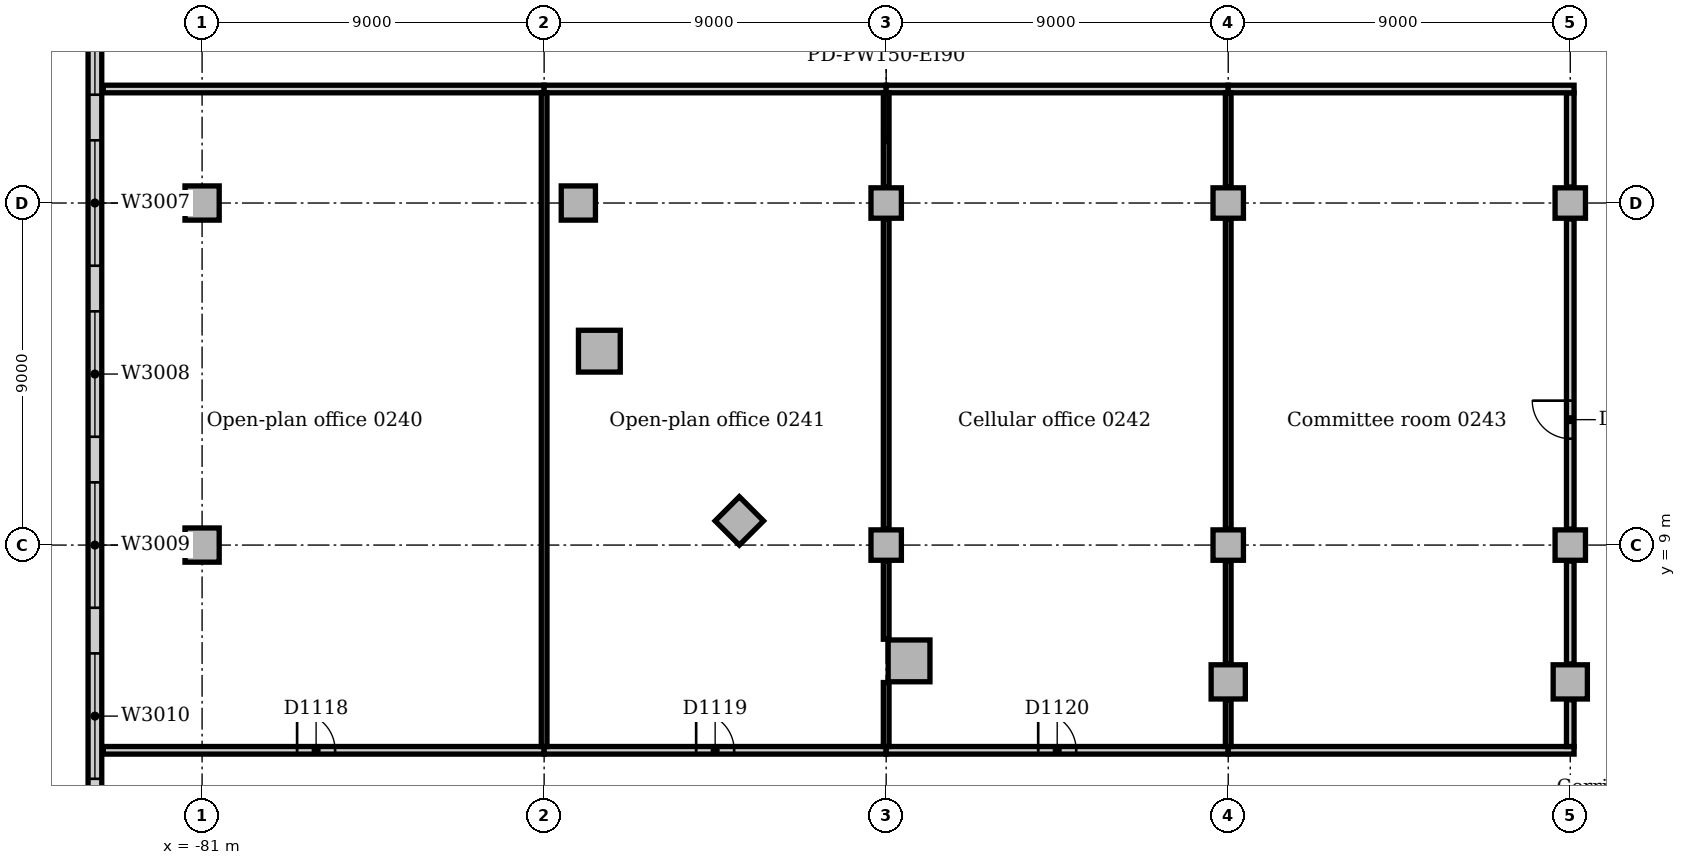
"""IFC4 building model, lengths in metres.
Left out: names, types, materials, properties, quantities, classifications, styles, units other than length and angle.
Written with IfcOpenShell. Run it as: python <this file> out.ifc"""

import sys

from ifc_helpers import new_model, si_unit, direction, frame, frame_2d, origin, origin_2d, place, context, subcontext, project, spatial, rectangle, extrude, element, fill, save


model = new_model("IFC4")
c1 = context("Model", 3, precision=1e-05, world=origin(), true_north=direction((0.0, 1.0)))
c2 = subcontext(c1, "Body", "Model", "MODEL_VIEW")
j1 = project(units=[si_unit("LENGTHUNIT", "METRE"), si_unit("PLANEANGLEUNIT", "RADIAN")], contexts=[c1])
p1 = place(None, origin())
s1 = spatial("IfcSite", under=j1, at=p1, CompositionType="ELEMENT")
p2 = place(p1, origin())
s2 = spatial("IfcBuilding", under=s1, at=p2, CompositionType="ELEMENT")
p3 = place(p2, frame((0.0, 0.0, 11.0)))
s3 = spatial("IfcBuildingStorey", under=s2, at=p3, CompositionType="ELEMENT", Elevation=11.0)
for number, where, z_axis, x_axis in (
    (1, (-62.398, 5.953, 0.0), (0.0, 0.0, 1.0), (1.0, 0.0, 0.0)),
    (2, (-70.547, 14.102, 0.0), (0.0, 0.0, 1.0), (1.0, 0.0, 0.0)),
):
    element("IfcColumn", number, at=place(p3, frame(where, z_axis=z_axis, x_axis=x_axis)), inside=s3, PredefinedType="COLUMN", context=c2, shape_type="SweptSolid", body=[
        extrude(rectangle(XDim=1.1, YDim=1.1, at=origin_2d()), origin(), (0.0, 0.0, 1.0), 4.7),
    ])
for number, where, z_axis, x_axis in (
    (3, (-54.0, 5.4, 0.0), (0.0, 0.0, 1.0), (1.0, 0.0, 0.0)),
    (4, (-45.0, 5.4, 0.0), (0.0, 0.0, 1.0), (1.0, 0.0, 0.0)),
    (5, (-71.1, 18.0, 0.0), (0.0, 0.0, 1.0), (1.0, 0.0, 0.0)),
    (6, (-66.864, 9.636, 0.0), (0.0, 0.0, 1.0), (0.707, 0.707, 0.0)),
):
    element("IfcColumn", number, at=place(p3, frame(where, z_axis=z_axis, x_axis=x_axis)), inside=s3, PredefinedType="COLUMN", context=c2, shape_type="SweptSolid", body=[
        extrude(rectangle(XDim=0.9, YDim=0.9, at=origin_2d()), origin(), (0.0, 0.0, 1.0), 4.7),
    ])
for number, where, z_axis, x_axis in (
    (7, (-63.0, 9.0, 0.0), (0.0, 0.0, 1.0), (1.0, 0.0, 0.0)),
    (8, (-63.0, 18.0, 0.0), (0.0, 0.0, 1.0), (1.0, 0.0, 0.0)),
    (9, (-54.0, 9.0, 0.0), (0.0, 0.0, 1.0), (1.0, 0.0, 0.0)),
    (10, (-54.0, 18.0, 0.0), (0.0, 0.0, 1.0), (1.0, 0.0, 0.0)),
    (11, (-45.0, 9.0, 0.0), (0.0, 0.0, 1.0), (1.0, 0.0, 0.0)),
    (12, (-45.0, 18.0, 0.0), (0.0, 0.0, 1.0), (1.0, 0.0, 0.0)),
):
    element("IfcColumn", number, at=place(p3, frame(where, z_axis=z_axis, x_axis=x_axis)), inside=s3, PredefinedType="COLUMN", context=c2, shape_type="SweptSolid", body=[
        extrude(rectangle(XDim=0.8, YDim=0.8, at=origin_2d()), origin(), (0.0, 0.0, 1.0), 4.7),
    ])
for number, where, z_axis, x_axis in (
    (13, (-81.0, 9.0, 0.0), (0.0, 0.0, 1.0), (1.0, 0.0, 0.0)),
    (14, (-81.0, 18.0, 0.0), (0.0, 0.0, 1.0), (1.0, 0.0, 0.0)),
):
    element("IfcColumn", number, at=place(p3, frame(where, z_axis=z_axis, x_axis=x_axis)), inside=s3, PredefinedType="COLUMN", context=c2, shape_type="SweptSolid", body=[
        extrude(rectangle(XDim=0.9, YDim=0.9, at=origin_2d()), origin(), (0.0, 0.0, 1.0), 4.7),
    ])
p4 = place(p3, frame((-83.82, 54.0, 0.0), z_axis=(0.0, 0.0, 1.0), x_axis=(0.0, -1.0, 0.0)))
e15 = element("IfcWall", 15, at=p4, inside=s3, PredefinedType="STANDARD", context=c2, shape_type="SweptSolid", body=[
    extrude(rectangle(XDim=63.0, YDim=0.36, at=frame_2d((31.5, 0.0))), origin(), (0.0, 0.0, 1.0), 4.7),
])
p5 = place(p4, frame((2.85, 0.0, 0.9)))
e16 = element("IfcOpeningElement", 16, at=p5, cuts=e15, PredefinedType="OPENING", context=c2, shape_type="SweptSolid", body=[
    extrude(rectangle(XDim=3.3, YDim=2.4, at=frame_2d((1.65, 1.2))), frame((0.0, 0.19, 0.0), z_axis=(0.0, -1.0, 0.0), x_axis=(1.0, 0.0, 0.0)), (0.0, 0.0, 1.0), 0.38),
])
p6 = place(p4, frame((7.35, 0.0, 0.9)))
e17 = element("IfcOpeningElement", 17, at=p6, cuts=e15, PredefinedType="OPENING", context=c2, shape_type="SweptSolid", body=[
    extrude(rectangle(XDim=3.3, YDim=2.4, at=frame_2d((1.65, 1.2))), frame((0.0, 0.19, 0.0), z_axis=(0.0, -1.0, 0.0), x_axis=(1.0, 0.0, 0.0)), (0.0, 0.0, 1.0), 0.38),
])
p7 = place(p4, frame((11.85, 0.0, 0.9)))
e18 = element("IfcOpeningElement", 18, at=p7, cuts=e15, PredefinedType="OPENING", context=c2, shape_type="SweptSolid", body=[
    extrude(rectangle(XDim=3.3, YDim=2.4, at=frame_2d((1.65, 1.2))), frame((0.0, 0.19, 0.0), z_axis=(0.0, -1.0, 0.0), x_axis=(1.0, 0.0, 0.0)), (0.0, 0.0, 1.0), 0.38),
])
p8 = place(p4, frame((16.35, 0.0, 0.9)))
e19 = element("IfcOpeningElement", 19, at=p8, cuts=e15, PredefinedType="OPENING", context=c2, shape_type="SweptSolid", body=[
    extrude(rectangle(XDim=3.3, YDim=2.4, at=frame_2d((1.65, 1.2))), frame((0.0, 0.19, 0.0), z_axis=(0.0, -1.0, 0.0), x_axis=(1.0, 0.0, 0.0)), (0.0, 0.0, 1.0), 0.38),
])
p9 = place(p4, frame((20.85, 0.0, 0.9)))
e20 = element("IfcOpeningElement", 20, at=p9, cuts=e15, PredefinedType="OPENING", context=c2, shape_type="SweptSolid", body=[
    extrude(rectangle(XDim=3.3, YDim=2.4, at=frame_2d((1.65, 1.2))), frame((0.0, 0.19, 0.0), z_axis=(0.0, -1.0, 0.0), x_axis=(1.0, 0.0, 0.0)), (0.0, 0.0, 1.0), 0.38),
])
p10 = place(p4, frame((25.35, 0.0, 0.9)))
e21 = element("IfcOpeningElement", 21, at=p10, cuts=e15, PredefinedType="OPENING", context=c2, shape_type="SweptSolid", body=[
    extrude(rectangle(XDim=3.3, YDim=2.4, at=frame_2d((1.65, 1.2))), frame((0.0, 0.19, 0.0), z_axis=(0.0, -1.0, 0.0), x_axis=(1.0, 0.0, 0.0)), (0.0, 0.0, 1.0), 0.38),
])
p11 = place(p4, frame((29.85, 0.0, 0.9)))
e22 = element("IfcOpeningElement", 22, at=p11, cuts=e15, PredefinedType="OPENING", context=c2, shape_type="SweptSolid", body=[
    extrude(rectangle(XDim=3.3, YDim=2.4, at=frame_2d((1.65, 1.2))), frame((0.0, 0.19, 0.0), z_axis=(0.0, -1.0, 0.0), x_axis=(1.0, 0.0, 0.0)), (0.0, 0.0, 1.0), 0.38),
])
p12 = place(p4, frame((34.35, 0.0, 0.9)))
e23 = element("IfcOpeningElement", 23, at=p12, cuts=e15, PredefinedType="OPENING", context=c2, shape_type="SweptSolid", body=[
    extrude(rectangle(XDim=3.3, YDim=2.4, at=frame_2d((1.65, 1.2))), frame((0.0, 0.19, 0.0), z_axis=(0.0, -1.0, 0.0), x_axis=(1.0, 0.0, 0.0)), (0.0, 0.0, 1.0), 0.38),
])
p13 = place(p4, frame((38.85, 0.0, 0.9)))
e24 = element("IfcOpeningElement", 24, at=p13, cuts=e15, PredefinedType="OPENING", context=c2, shape_type="SweptSolid", body=[
    extrude(rectangle(XDim=3.3, YDim=2.4, at=frame_2d((1.65, 1.2))), frame((0.0, 0.19, 0.0), z_axis=(0.0, -1.0, 0.0), x_axis=(1.0, 0.0, 0.0)), (0.0, 0.0, 1.0), 0.38),
])
p14 = place(p4, frame((43.35, 0.0, 0.9)))
e25 = element("IfcOpeningElement", 25, at=p14, cuts=e15, PredefinedType="OPENING", context=c2, shape_type="SweptSolid", body=[
    extrude(rectangle(XDim=3.3, YDim=2.4, at=frame_2d((1.65, 1.2))), frame((0.0, 0.19, 0.0), z_axis=(0.0, -1.0, 0.0), x_axis=(1.0, 0.0, 0.0)), (0.0, 0.0, 1.0), 0.38),
])
p15 = place(p4, frame((47.85, 0.0, 0.9)))
e26 = element("IfcOpeningElement", 26, at=p15, cuts=e15, PredefinedType="OPENING", context=c2, shape_type="SweptSolid", body=[
    extrude(rectangle(XDim=3.3, YDim=2.4, at=frame_2d((1.65, 1.2))), frame((0.0, 0.19, 0.0), z_axis=(0.0, -1.0, 0.0), x_axis=(1.0, 0.0, 0.0)), (0.0, 0.0, 1.0), 0.38),
])
p16 = place(p4, frame((52.35, 0.0, 0.9)))
e27 = element("IfcOpeningElement", 27, at=p16, cuts=e15, PredefinedType="OPENING", context=c2, shape_type="SweptSolid", body=[
    extrude(rectangle(XDim=3.3, YDim=2.4, at=frame_2d((1.65, 1.2))), frame((0.0, 0.19, 0.0), z_axis=(0.0, -1.0, 0.0), x_axis=(1.0, 0.0, 0.0)), (0.0, 0.0, 1.0), 0.38),
])
p17 = place(p4, frame((56.85, 0.0, 0.9)))
e28 = element("IfcOpeningElement", 28, at=p17, cuts=e15, PredefinedType="OPENING", context=c2, shape_type="SweptSolid", body=[
    extrude(rectangle(XDim=3.3, YDim=2.4, at=frame_2d((1.65, 1.2))), frame((0.0, 0.19, 0.0), z_axis=(0.0, -1.0, 0.0), x_axis=(1.0, 0.0, 0.0)), (0.0, 0.0, 1.0), 0.38),
])
p18 = place(p3, frame((-83.6, 3.6, 0.0), z_axis=(0.0, 0.0, 1.0), x_axis=(1.0, 0.0, 0.0)))
e29 = element("IfcWall", 29, at=p18, inside=s3, PredefinedType="PARTITIONING", context=c2, shape_type="SweptSolid", body=[
    extrude(rectangle(XDim=11.6, YDim=0.2, at=frame_2d((5.8, 0.0))), origin(), (0.0, 0.0, 1.0), 4.7),
])
p19 = place(p18, frame((5.1, 0.0, 0.0)))
e30 = element("IfcOpeningElement", 30, at=p19, cuts=e29, PredefinedType="OPENING", context=c2, shape_type="SweptSolid", body=[
    extrude(rectangle(XDim=1.0, YDim=2.1, at=frame_2d((0.5, 1.05))), frame((0.0, 0.11, 0.0), z_axis=(0.0, -1.0, 0.0), x_axis=(1.0, 0.0, 0.0)), (0.0, 0.0, 1.0), 0.22),
])
p20 = place(p3, frame((-72.0, 3.6, 0.0), z_axis=(0.0, 0.0, 1.0), x_axis=(1.0, 0.0, 0.0)))
e31 = element("IfcWall", 31, at=p20, inside=s3, PredefinedType="PARTITIONING", context=c2, shape_type="SweptSolid", body=[
    extrude(rectangle(XDim=9.0, YDim=0.2, at=frame_2d((4.5, 0.0))), origin(), (0.0, 0.0, 1.0), 4.7),
])
p21 = place(p20, frame((4.0, 0.0, 0.0)))
e32 = element("IfcOpeningElement", 32, at=p21, cuts=e31, PredefinedType="OPENING", context=c2, shape_type="SweptSolid", body=[
    extrude(rectangle(XDim=1.0, YDim=2.1, at=frame_2d((0.5, 1.05))), frame((0.0, 0.11, 0.0), z_axis=(0.0, -1.0, 0.0), x_axis=(1.0, 0.0, 0.0)), (0.0, 0.0, 1.0), 0.22),
])
p22 = place(p3, frame((-63.0, 3.6, 0.0), z_axis=(0.0, 0.0, 1.0), x_axis=(1.0, 0.0, 0.0)))
e33 = element("IfcWall", 33, at=p22, inside=s3, PredefinedType="PARTITIONING", context=c2, shape_type="SweptSolid", body=[
    extrude(rectangle(XDim=9.0, YDim=0.2, at=frame_2d((4.5, 0.0))), origin(), (0.0, 0.0, 1.0), 4.7),
])
p23 = place(p22, frame((4.0, 0.0, 0.0)))
e34 = element("IfcOpeningElement", 34, at=p23, cuts=e33, PredefinedType="OPENING", context=c2, shape_type="SweptSolid", body=[
    extrude(rectangle(XDim=1.0, YDim=2.1, at=frame_2d((0.5, 1.05))), frame((0.0, 0.11, 0.0), z_axis=(0.0, -1.0, 0.0), x_axis=(1.0, 0.0, 0.0)), (0.0, 0.0, 1.0), 0.22),
])
p24 = place(p3, frame((-54.0, 3.6, 0.0), z_axis=(0.0, 0.0, 1.0), x_axis=(1.0, 0.0, 0.0)))
e35 = element("IfcWall", 35, at=p24, inside=s3, PredefinedType="PARTITIONING", context=c2, shape_type="SweptSolid", body=[
    extrude(rectangle(XDim=9.1, YDim=0.2, at=frame_2d((4.55, 0.0))), origin(), (0.0, 0.0, 1.0), 4.7),
])
p25 = place(p3, frame((-45.0, 3.7, 0.0), z_axis=(0.0, 0.0, 1.0), x_axis=(0.0, 1.0, 0.0)))
e36 = element("IfcWall", 36, at=p25, inside=s3, PredefinedType="PARTITIONING", context=c2, shape_type="SweptSolid", body=[
    extrude(rectangle(XDim=1.23, YDim=0.2, at=frame_2d((0.615, 0.0))), origin(), (0.0, 0.0, 1.0), 4.7),
])
p26 = place(p3, frame((-45.0, 5.87, 0.0), z_axis=(0.0, 0.0, 1.0), x_axis=(0.0, 1.0, 0.0)))
e37 = element("IfcWall", 37, at=p26, inside=s3, PredefinedType="PARTITIONING", context=c2, shape_type="SweptSolid", body=[
    extrude(rectangle(XDim=2.71, YDim=0.2, at=frame_2d((1.355, 0.0))), origin(), (0.0, 0.0, 1.0), 4.7),
])
p27 = place(p3, frame((-45.0, 9.42, 0.0), z_axis=(0.0, 0.0, 1.0), x_axis=(0.0, 1.0, 0.0)))
e38 = element("IfcWall", 38, at=p27, inside=s3, PredefinedType="PARTITIONING", context=c2, shape_type="SweptSolid", body=[
    extrude(rectangle(XDim=8.16, YDim=0.2, at=frame_2d((4.08, 0.0))), origin(), (0.0, 0.0, 1.0), 4.7),
])
p28 = place(p27, frame((2.38, 0.0, 0.0)))
e39 = element("IfcOpeningElement", 39, at=p28, cuts=e38, PredefinedType="OPENING", context=c2, shape_type="SweptSolid", body=[
    extrude(rectangle(XDim=1.0, YDim=2.1, at=frame_2d((0.5, 1.05))), frame((0.0, 0.11, 0.0), z_axis=(0.0, -1.0, 0.0), x_axis=(1.0, 0.0, 0.0)), (0.0, 0.0, 1.0), 0.22),
])
p29 = place(p3, frame((-45.0, 18.42, 0.0), z_axis=(0.0, 0.0, 1.0), x_axis=(0.0, 1.0, 0.0)))
e40 = element("IfcWall", 40, at=p29, inside=s3, PredefinedType="PARTITIONING", context=c2, shape_type="SweptSolid", body=[
    extrude(rectangle(XDim=2.48, YDim=0.2, at=frame_2d((1.24, 0.0))), origin(), (0.0, 0.0, 1.0), 4.7),
])
p30 = place(p3, frame((-83.6, 21.0, 0.0), z_axis=(0.0, 0.0, 1.0), x_axis=(1.0, 0.0, 0.0)))
e41 = element("IfcWall", 41, at=p30, inside=s3, PredefinedType="PARTITIONING", context=c2, shape_type="SweptSolid", body=[
    extrude(rectangle(XDim=11.6, YDim=0.2, at=frame_2d((5.8, 0.0))), origin(), (0.0, 0.0, 1.0), 4.7),
])
for number, where, z_axis, x_axis in (
    (42, (-72.0, 21.0, 0.0), (0.0, 0.0, 1.0), (1.0, 0.0, 0.0)),
    (43, (-63.0, 21.0, 0.0), (0.0, 0.0, 1.0), (1.0, 0.0, 0.0)),
):
    element("IfcWall", number, at=place(p3, frame(where, z_axis=z_axis, x_axis=x_axis)), inside=s3, PredefinedType="PARTITIONING", context=c2, shape_type="SweptSolid", body=[
        extrude(rectangle(XDim=9.0, YDim=0.2, at=frame_2d((4.5, 0.0))), origin(), (0.0, 0.0, 1.0), 4.7),
    ])
p31 = place(p3, frame((-54.0, 21.0, 0.0), z_axis=(0.0, 0.0, 1.0), x_axis=(1.0, 0.0, 0.0)))
e44 = element("IfcWall", 44, at=p31, inside=s3, PredefinedType="PARTITIONING", context=c2, shape_type="SweptSolid", body=[
    extrude(rectangle(XDim=9.1, YDim=0.2, at=frame_2d((4.55, 0.0))), origin(), (0.0, 0.0, 1.0), 4.7),
])
p32 = place(p3, frame((-72.0, 3.7, 0.0), z_axis=(0.0, 0.0, 1.0), x_axis=(0.0, 1.0, 0.0)))
e45 = element("IfcWall", 45, at=p32, inside=s3, PredefinedType="PARTITIONING", context=c2, shape_type="SweptSolid", body=[
    extrude(rectangle(XDim=17.2, YDim=0.15, at=frame_2d((8.6, 0.0))), origin(), (0.0, 0.0, 1.0), 4.7),
])
p33 = place(p3, frame((-63.0, 3.7, 0.0), z_axis=(0.0, 0.0, 1.0), x_axis=(0.0, 1.0, 0.0)))
e46 = element("IfcWall", 46, at=p33, inside=s3, PredefinedType="PARTITIONING", context=c2, shape_type="SweptSolid", body=[
    extrude(rectangle(XDim=1.683, YDim=0.15, at=frame_2d((0.842, 0.0))), origin(), (0.0, 0.0, 1.0), 4.7),
])
p34 = place(p3, frame((-63.0, 6.523, 0.0), z_axis=(0.0, 0.0, 1.0), x_axis=(0.0, 1.0, 0.0)))
e47 = element("IfcWall", 47, at=p34, inside=s3, PredefinedType="PARTITIONING", context=c2, shape_type="SweptSolid", body=[
    extrude(rectangle(XDim=2.057, YDim=0.15, at=frame_2d((1.028, 0.0))), origin(), (0.0, 0.0, 1.0), 4.7),
])
p35 = place(p3, frame((-63.0, 9.42, 0.0), z_axis=(0.0, 0.0, 1.0), x_axis=(0.0, 1.0, 0.0)))
e48 = element("IfcWall", 48, at=p35, inside=s3, PredefinedType="PARTITIONING", context=c2, shape_type="SweptSolid", body=[
    extrude(rectangle(XDim=8.16, YDim=0.15, at=frame_2d((4.08, 0.0))), origin(), (0.0, 0.0, 1.0), 4.7),
])
p36 = place(p3, frame((-63.0, 18.42, 0.0), z_axis=(0.0, 0.0, 1.0), x_axis=(0.0, 1.0, 0.0)))
e49 = element("IfcWall", 49, at=p36, inside=s3, PredefinedType="PARTITIONING", context=c2, shape_type="SweptSolid", body=[
    extrude(rectangle(XDim=2.48, YDim=0.15, at=frame_2d((1.24, 0.0))), origin(), (0.0, 0.0, 1.0), 4.7),
])
p37 = place(p3, frame((-54.0, 3.7, 0.0), z_axis=(0.0, 0.0, 1.0), x_axis=(0.0, 1.0, 0.0)))
e50 = element("IfcWall", 50, at=p37, inside=s3, PredefinedType="PARTITIONING", context=c2, shape_type="SweptSolid", body=[
    extrude(rectangle(XDim=1.23, YDim=0.15, at=frame_2d((0.615, 0.0))), origin(), (0.0, 0.0, 1.0), 4.7),
])
p38 = place(p3, frame((-54.0, 5.87, 0.0), z_axis=(0.0, 0.0, 1.0), x_axis=(0.0, 1.0, 0.0)))
e51 = element("IfcWall", 51, at=p38, inside=s3, PredefinedType="PARTITIONING", context=c2, shape_type="SweptSolid", body=[
    extrude(rectangle(XDim=2.71, YDim=0.15, at=frame_2d((1.355, 0.0))), origin(), (0.0, 0.0, 1.0), 4.7),
])
p39 = place(p3, frame((-54.0, 9.42, 0.0), z_axis=(0.0, 0.0, 1.0), x_axis=(0.0, 1.0, 0.0)))
e52 = element("IfcWall", 52, at=p39, inside=s3, PredefinedType="PARTITIONING", context=c2, shape_type="SweptSolid", body=[
    extrude(rectangle(XDim=8.16, YDim=0.15, at=frame_2d((4.08, 0.0))), origin(), (0.0, 0.0, 1.0), 4.7),
])
p40 = place(p3, frame((-54.0, 18.42, 0.0), z_axis=(0.0, 0.0, 1.0), x_axis=(0.0, 1.0, 0.0)))
e53 = element("IfcWall", 53, at=p40, inside=s3, PredefinedType="PARTITIONING", context=c2, shape_type="SweptSolid", body=[
    extrude(rectangle(XDim=2.48, YDim=0.15, at=frame_2d((1.24, 0.0))), origin(), (0.0, 0.0, 1.0), 4.7),
])
p41 = place(p11, origin())
e54 = element("IfcWindow", 54, at=p41, inside=s3, PartitioningType="SINGLE_PANEL", PredefinedType="WINDOW", context=c2, shape_type="SweptSolid", body=[
    extrude(rectangle(XDim=3.3, YDim=2.4, at=frame_2d((1.65, 1.2))), frame((0.0, 0.13, 0.0), z_axis=(0.0, -1.0, 0.0), x_axis=(1.0, 0.0, 0.0)), (0.0, 0.0, 1.0), 0.06),
])
fill(e22, e54)
p42 = place(p12, origin())
e55 = element("IfcWindow", 55, at=p42, inside=s3, PartitioningType="SINGLE_PANEL", PredefinedType="WINDOW", context=c2, shape_type="SweptSolid", body=[
    extrude(rectangle(XDim=3.3, YDim=2.4, at=frame_2d((1.65, 1.2))), frame((0.0, 0.13, 0.0), z_axis=(0.0, -1.0, 0.0), x_axis=(1.0, 0.0, 0.0)), (0.0, 0.0, 1.0), 0.06),
])
fill(e23, e55)
p43 = place(p13, origin())
e56 = element("IfcWindow", 56, at=p43, inside=s3, PartitioningType="SINGLE_PANEL", PredefinedType="WINDOW", context=c2, shape_type="SweptSolid", body=[
    extrude(rectangle(XDim=3.3, YDim=2.4, at=frame_2d((1.65, 1.2))), frame((0.0, 0.13, 0.0), z_axis=(0.0, -1.0, 0.0), x_axis=(1.0, 0.0, 0.0)), (0.0, 0.0, 1.0), 0.06),
])
fill(e24, e56)
p44 = place(p14, origin())
e57 = element("IfcWindow", 57, at=p44, inside=s3, PartitioningType="SINGLE_PANEL", PredefinedType="WINDOW", context=c2, shape_type="SweptSolid", body=[
    extrude(rectangle(XDim=3.3, YDim=2.4, at=frame_2d((1.65, 1.2))), frame((0.0, 0.13, 0.0), z_axis=(0.0, -1.0, 0.0), x_axis=(1.0, 0.0, 0.0)), (0.0, 0.0, 1.0), 0.06),
])
fill(e25, e57)
p45 = place(p15, origin())
e58 = element("IfcWindow", 58, at=p45, inside=s3, PartitioningType="SINGLE_PANEL", PredefinedType="WINDOW", context=c2, shape_type="SweptSolid", body=[
    extrude(rectangle(XDim=3.3, YDim=2.4, at=frame_2d((1.65, 1.2))), frame((0.0, 0.13, 0.0), z_axis=(0.0, -1.0, 0.0), x_axis=(1.0, 0.0, 0.0)), (0.0, 0.0, 1.0), 0.06),
])
fill(e26, e58)
p46 = place(p19, origin())
e59 = element("IfcDoor", 59, at=p46, inside=s3, OperationType="SINGLE_SWING_LEFT", PredefinedType="DOOR", context=c2, shape_type="SweptSolid", body=[
    extrude(rectangle(XDim=1.0, YDim=2.1, at=frame_2d((0.5, 1.05))), frame((0.0, 0.025, 0.0), z_axis=(0.0, -1.0, 0.0), x_axis=(1.0, 0.0, 0.0)), (0.0, 0.0, 1.0), 0.05),
])
fill(e30, e59)
p47 = place(p21, origin())
e60 = element("IfcDoor", 60, at=p47, inside=s3, OperationType="SINGLE_SWING_LEFT", PredefinedType="DOOR", context=c2, shape_type="SweptSolid", body=[
    extrude(rectangle(XDim=1.0, YDim=2.1, at=frame_2d((0.5, 1.05))), frame((0.0, 0.025, 0.0), z_axis=(0.0, -1.0, 0.0), x_axis=(1.0, 0.0, 0.0)), (0.0, 0.0, 1.0), 0.05),
])
fill(e32, e60)
p48 = place(p23, origin())
e61 = element("IfcDoor", 61, at=p48, inside=s3, OperationType="SINGLE_SWING_LEFT", PredefinedType="DOOR", context=c2, shape_type="SweptSolid", body=[
    extrude(rectangle(XDim=1.0, YDim=2.1, at=frame_2d((0.5, 1.05))), frame((0.0, 0.025, 0.0), z_axis=(0.0, -1.0, 0.0), x_axis=(1.0, 0.0, 0.0)), (0.0, 0.0, 1.0), 0.05),
])
fill(e34, e61)
p49 = place(p28, origin())
e62 = element("IfcDoor", 62, at=p49, inside=s3, OperationType="SINGLE_SWING_RIGHT", PredefinedType="DOOR", context=c2, shape_type="SweptSolid", body=[
    extrude(rectangle(XDim=1.0, YDim=2.1, at=frame_2d((0.5, 1.05))), frame((0.0, 0.025, 0.0), z_axis=(0.0, -1.0, 0.0), x_axis=(1.0, 0.0, 0.0)), (0.0, 0.0, 1.0), 0.05),
])
fill(e39, e62)
save(model, sys.argv[1])
